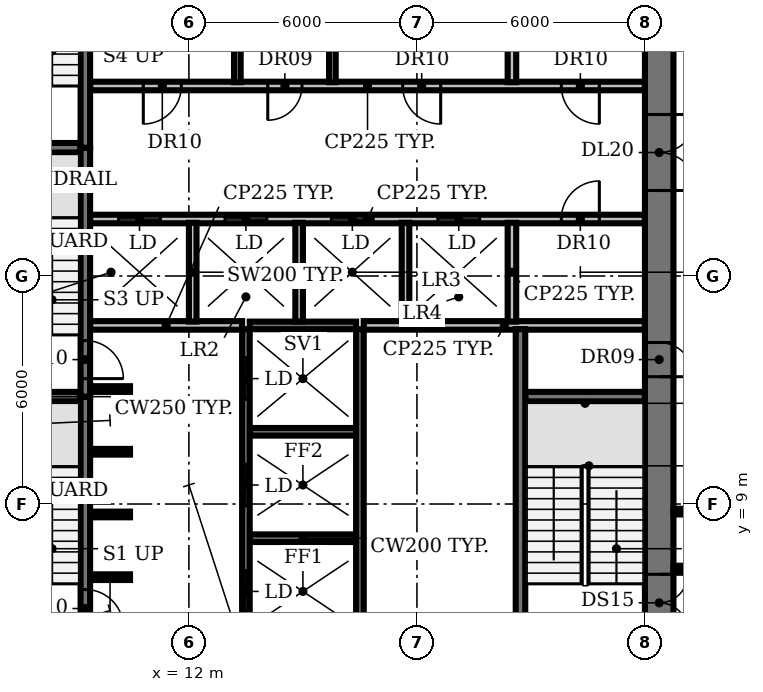
"""IFC4 building model, lengths in metres.
Left out: names, types, materials, properties, quantities, classifications, styles, units other than length and angle.
Written with IfcOpenShell. Run it as: python <this file> out.ifc"""

import sys

from ifc_helpers import new_model, si_unit, direction, frame, frame_2d, origin, place, context, subcontext, project, spatial, rectangle, extrude, element, fill, save


model = new_model("IFC4")
c1 = context("Model", 3, precision=1e-05, world=origin(), true_north=direction((0.0, 1.0)))
c2 = subcontext(c1, "Body", "Model", "MODEL_VIEW")
j1 = project(units=[si_unit("LENGTHUNIT", "METRE"), si_unit("PLANEANGLEUNIT", "RADIAN")], contexts=[c1])
p1 = place(None, origin())
s1 = spatial("IfcSite", under=j1, at=p1, CompositionType="ELEMENT")
p2 = place(p1, origin())
s2 = spatial("IfcBuilding", under=s1, at=p2, CompositionType="ELEMENT")
p3 = place(p2, frame((0.0, 0.0, 121.4)))
s3 = spatial("IfcBuildingStorey", under=s2, at=p3, CompositionType="ELEMENT", Elevation=121.4)
p4 = place(p3, frame((9.4, 7.075, 0.0), z_axis=(0.0, 0.0, 1.0), x_axis=(1.0, 0.0, 0.0)))
e1 = element("IfcWall", 1, at=p4, inside=s3, PredefinedType="SHEAR", context=c2, shape_type="SweptSolid", body=[
    extrude(rectangle(XDim=1.05, YDim=0.15, at=frame_2d((0.525, 0.0))), origin(), (0.0, 0.0, 1.0), 3.85),
])
p5 = place(p3, frame((13.6, 8.1, 0.0), z_axis=(0.0, 0.0, 1.0), x_axis=(1.0, 0.0, 0.0)))
e2 = element("IfcWall", 2, at=p5, inside=s3, PredefinedType="SHEAR", context=c2, shape_type="SweptSolid", body=[
    extrude(rectangle(XDim=2.8, YDim=0.2, at=frame_2d((1.4, 0.0))), origin(), (0.0, 0.0, 1.0), 3.85),
])
for number, where, z_axis, x_axis in (
    (3, (9.4, 8.725, 0.0), (0.0, 0.0, 1.0), (1.0, 0.0, 0.0)),
    (4, (9.4, 10.375, 0.0), (0.0, 0.0, 1.0), (1.0, 0.0, 0.0)),
):
    element("IfcWall", number, at=place(p3, frame(where, z_axis=z_axis, x_axis=x_axis)), inside=s3, PredefinedType="SHEAR", context=c2, shape_type="SweptSolid", body=[
        extrude(rectangle(XDim=1.05, YDim=0.15, at=frame_2d((0.525, 0.0))), origin(), (0.0, 0.0, 1.0), 3.85),
    ])
p6 = place(p3, frame((13.6, 10.9, 0.0), z_axis=(0.0, 0.0, 1.0), x_axis=(1.0, 0.0, 0.0)))
e5 = element("IfcWall", 5, at=p6, inside=s3, PredefinedType="SHEAR", context=c2, shape_type="SweptSolid", body=[
    extrude(rectangle(XDim=2.8, YDim=0.2, at=frame_2d((1.4, 0.0))), origin(), (0.0, 0.0, 1.0), 3.85),
])
for number, where, z_axis, x_axis in (
    (6, (6.0, 11.825, 0.0), (0.0, 0.0, 1.0), (1.0, 0.0, 0.0)),
    (7, (20.85, 11.825, 0.0), (0.0, 0.0, 1.0), (1.0, 0.0, 0.0)),
):
    element("IfcWall", number, at=place(p3, frame(where, z_axis=z_axis, x_axis=x_axis)), inside=s3, PredefinedType="SHEAR", context=c2, shape_type="SweptSolid", body=[
        extrude(rectangle(XDim=3.15, YDim=0.25, at=frame_2d((1.575, 0.0))), origin(), (0.0, 0.0, 1.0), 3.85),
    ])
p7 = place(p3, frame((9.4, 12.025, 0.0), z_axis=(0.0, 0.0, 1.0), x_axis=(1.0, 0.0, 0.0)))
e8 = element("IfcWall", 8, at=p7, inside=s3, PredefinedType="SHEAR", context=c2, shape_type="SweptSolid", body=[
    extrude(rectangle(XDim=1.05, YDim=0.15, at=frame_2d((0.525, 0.0))), origin(), (0.0, 0.0, 1.0), 3.85),
])
p8 = place(p3, frame((9.4, 13.7, 0.0), z_axis=(0.0, 0.0, 1.0), x_axis=(1.0, 0.0, 0.0)))
e9 = element("IfcWall", 9, at=p8, inside=s3, PredefinedType="PARTITIONING", context=c2, shape_type="SweptSolid", body=[
    extrude(rectangle(XDim=4.0, YDim=0.225, at=frame_2d((2.0, 0.0))), origin(), (0.0, 0.0, 1.0), 3.85),
])
p9 = place(p3, frame((13.6, 13.7, 0.0), z_axis=(0.0, 0.0, 1.0), x_axis=(1.0, 0.0, 0.0)))
e10 = element("IfcWall", 10, at=p9, inside=s3, PredefinedType="SHEAR", context=c2, shape_type="SweptSolid", body=[
    extrude(rectangle(XDim=2.8, YDim=0.2, at=frame_2d((1.4, 0.0))), origin(), (0.0, 0.0, 1.0), 3.85),
])
p10 = place(p3, frame((16.6, 13.7, 0.0), z_axis=(0.0, 0.0, 1.0), x_axis=(1.0, 0.0, 0.0)))
e11 = element("IfcWall", 11, at=p10, inside=s3, PredefinedType="PARTITIONING", context=c2, shape_type="SweptSolid", body=[
    extrude(rectangle(XDim=7.4, YDim=0.225, at=frame_2d((3.7, 0.0))), origin(), (0.0, 0.0, 1.0), 3.85),
])
p11 = place(p3, frame((9.4, 16.5, 0.0), z_axis=(0.0, 0.0, 1.0), x_axis=(1.0, 0.0, 0.0)))
e12 = element("IfcWall", 12, at=p11, inside=s3, PredefinedType="PARTITIONING", context=c2, shape_type="SweptSolid", body=[
    extrude(rectangle(XDim=14.6, YDim=0.225, at=frame_2d((7.3, 0.0))), origin(), (0.0, 0.0, 1.0), 3.85),
])
p12 = place(p11, frame((0.75, 0.0, 0.0)))
e13 = element("IfcOpeningElement", 13, at=p12, cuts=e12, PredefinedType="OPENING", context=c2, shape_type="SweptSolid", body=[
    extrude(rectangle(XDim=1.1, YDim=2.1, at=frame_2d((0.55, 1.05))), frame((0.0, 0.123, 0.0), z_axis=(0.0, -1.0, 0.0), x_axis=(1.0, 0.0, 0.0)), (0.0, 0.0, 1.0), 0.245),
])
p13 = place(p11, frame((3.55, 0.0, 0.0)))
e14 = element("IfcOpeningElement", 14, at=p13, cuts=e12, PredefinedType="OPENING", context=c2, shape_type="SweptSolid", body=[
    extrude(rectangle(XDim=1.1, YDim=2.1, at=frame_2d((0.55, 1.05))), frame((0.0, 0.123, 0.0), z_axis=(0.0, -1.0, 0.0), x_axis=(1.0, 0.0, 0.0)), (0.0, 0.0, 1.0), 0.245),
])
p14 = place(p11, frame((6.35, 0.0, 0.0)))
e15 = element("IfcOpeningElement", 15, at=p14, cuts=e12, PredefinedType="OPENING", context=c2, shape_type="SweptSolid", body=[
    extrude(rectangle(XDim=1.1, YDim=2.1, at=frame_2d((0.55, 1.05))), frame((0.0, 0.123, 0.0), z_axis=(0.0, -1.0, 0.0), x_axis=(1.0, 0.0, 0.0)), (0.0, 0.0, 1.0), 0.245),
])
p15 = place(p11, frame((9.15, 0.0, 0.0)))
e16 = element("IfcOpeningElement", 16, at=p15, cuts=e12, PredefinedType="OPENING", context=c2, shape_type="SweptSolid", body=[
    extrude(rectangle(XDim=1.1, YDim=2.1, at=frame_2d((0.55, 1.05))), frame((0.0, 0.123, 0.0), z_axis=(0.0, -1.0, 0.0), x_axis=(1.0, 0.0, 0.0)), (0.0, 0.0, 1.0), 0.245),
])
p16 = place(p11, frame((12.4, 0.0, 0.0)))
e17 = element("IfcOpeningElement", 17, at=p16, cuts=e12, PredefinedType="OPENING", context=c2, shape_type="SweptSolid", body=[
    extrude(rectangle(XDim=1.0, YDim=2.1, at=frame_2d((0.5, 1.05))), frame((0.0, 0.123, 0.0), z_axis=(0.0, -1.0, 0.0), x_axis=(1.0, 0.0, 0.0)), (0.0, 0.0, 1.0), 0.245),
])
p17 = place(p3, frame((6.0, 18.375, 0.0), z_axis=(0.0, 0.0, 1.0), x_axis=(1.0, 0.0, 0.0)))
e18 = element("IfcWall", 18, at=p17, inside=s3, PredefinedType="SHEAR", context=c2, shape_type="SweptSolid", body=[
    extrude(rectangle(XDim=3.15, YDim=0.25, at=frame_2d((1.575, 0.0))), origin(), (0.0, 0.0, 1.0), 3.85),
])
p18 = place(p3, frame((24.0, 20.0, 0.0), z_axis=(0.0, 0.0, 1.0), x_axis=(-1.0, 0.0, 0.0)))
e19 = element("IfcWall", 19, at=p18, inside=s3, PredefinedType="PARTITIONING", context=c2, shape_type="SweptSolid", body=[
    extrude(rectangle(XDim=14.6, YDim=0.225, at=frame_2d((7.3, 0.0))), origin(), (0.0, 0.0, 1.0), 3.85),
])
p19 = place(p18, frame((12.2, 0.0, 0.0)))
e20 = element("IfcOpeningElement", 20, at=p19, cuts=e19, PredefinedType="OPENING", context=c2, shape_type="SweptSolid", body=[
    extrude(rectangle(XDim=1.0, YDim=2.1, at=frame_2d((0.5, 1.05))), frame((0.0, 0.123, 0.0), z_axis=(0.0, -1.0, 0.0), x_axis=(1.0, 0.0, 0.0)), (0.0, 0.0, 1.0), 0.245),
])
p20 = place(p18, frame((9.025, 0.0, 0.0)))
e21 = element("IfcOpeningElement", 21, at=p20, cuts=e19, PredefinedType="OPENING", context=c2, shape_type="SweptSolid", body=[
    extrude(rectangle(XDim=0.9, YDim=2.1, at=frame_2d((0.45, 1.05))), frame((0.0, 0.123, 0.0), z_axis=(0.0, -1.0, 0.0), x_axis=(1.0, 0.0, 0.0)), (0.0, 0.0, 1.0), 0.245),
])
p21 = place(p18, frame((5.375, 0.0, 0.0)))
e22 = element("IfcOpeningElement", 22, at=p21, cuts=e19, PredefinedType="OPENING", context=c2, shape_type="SweptSolid", body=[
    extrude(rectangle(XDim=1.0, YDim=2.1, at=frame_2d((0.5, 1.05))), frame((0.0, 0.123, 0.0), z_axis=(0.0, -1.0, 0.0), x_axis=(1.0, 0.0, 0.0)), (0.0, 0.0, 1.0), 0.245),
])
p22 = place(p18, frame((1.2, 0.0, 0.0)))
e23 = element("IfcOpeningElement", 23, at=p22, cuts=e19, PredefinedType="OPENING", context=c2, shape_type="SweptSolid", body=[
    extrude(rectangle(XDim=1.0, YDim=2.1, at=frame_2d((0.5, 1.05))), frame((0.0, 0.123, 0.0), z_axis=(0.0, -1.0, 0.0), x_axis=(1.0, 0.0, 0.0)), (0.0, 0.0, 1.0), 0.245),
])
p23 = place(p3, frame((9.275, 11.825, 0.0), z_axis=(0.0, 0.0, 1.0), x_axis=(0.0, -1.0, 0.0)))
e24 = element("IfcWall", 24, at=p23, inside=s3, PredefinedType="SHEAR", context=c2, shape_type="SweptSolid", body=[
    extrude(rectangle(XDim=6.425, YDim=0.25, at=frame_2d((3.212, 0.0))), origin(), (0.0, 0.0, 1.0), 3.85),
])
p24 = place(p23, frame((5.075, 0.0, 0.0)))
e25 = element("IfcOpeningElement", 25, at=p24, cuts=e24, PredefinedType="OPENING", context=c2, shape_type="SweptSolid", body=[
    extrude(rectangle(XDim=1.0, YDim=2.1, at=frame_2d((0.5, 1.05))), frame((0.0, 0.135, 0.0), z_axis=(0.0, -1.0, 0.0), x_axis=(1.0, 0.0, 0.0)), (0.0, 0.0, 1.0), 0.27),
])
p25 = place(p3, frame((9.275, 18.375, 0.0), z_axis=(0.0, 0.0, 1.0), x_axis=(0.0, -1.0, 0.0)))
e26 = element("IfcWall", 26, at=p25, inside=s3, PredefinedType="SHEAR", context=c2, shape_type="SweptSolid", body=[
    extrude(rectangle(XDim=6.55, YDim=0.25, at=frame_2d((3.275, 0.0))), origin(), (0.0, 0.0, 1.0), 3.85),
])
p26 = place(p25, frame((5.075, 0.0, 0.0)))
e27 = element("IfcOpeningElement", 27, at=p26, cuts=e26, PredefinedType="OPENING", context=c2, shape_type="SweptSolid", body=[
    extrude(rectangle(XDim=1.0, YDim=2.1, at=frame_2d((0.5, 1.05))), frame((0.0, 0.135, 0.0), z_axis=(0.0, -1.0, 0.0), x_axis=(1.0, 0.0, 0.0)), (0.0, 0.0, 1.0), 0.27),
])
p27 = place(p3, frame((9.275, 18.375, 0.0), z_axis=(0.0, 0.0, 1.0), x_axis=(0.0, 1.0, 0.0)))
e28 = element("IfcWall", 28, at=p27, inside=s3, PredefinedType="SHEAR", context=c2, shape_type="SweptSolid", body=[
    extrude(rectangle(XDim=6.425, YDim=0.25, at=frame_2d((3.212, 0.0))), origin(), (0.0, 0.0, 1.0), 3.85),
])
p28 = place(p3, frame((12.1, 13.8, 0.0), z_axis=(0.0, 0.0, 1.0), x_axis=(0.0, 1.0, 0.0)))
e29 = element("IfcWall", 29, at=p28, inside=s3, PredefinedType="SOLIDWALL", context=c2, shape_type="SweptSolid", body=[
    extrude(rectangle(XDim=2.6, YDim=0.2, at=frame_2d((1.3, 0.0))), origin(), (0.0, 0.0, 1.0), 3.85),
])
p29 = place(p3, frame((13.275, 20.1, 0.0), z_axis=(0.0, 0.0, 1.0), x_axis=(0.0, 1.0, 0.0)))
e30 = element("IfcWall", 30, at=p29, inside=s3, PredefinedType="PARTITIONING", context=c2, shape_type="SweptSolid", body=[
    extrude(rectangle(XDim=2.6, YDim=0.175, at=frame_2d((1.3, 0.0))), origin(), (0.0, 0.0, 1.0), 3.85),
])
p30 = place(p3, frame((13.5, 5.4, 0.0), z_axis=(0.0, 0.0, 1.0), x_axis=(0.0, 1.0, 0.0)))
e31 = element("IfcWall", 31, at=p30, inside=s3, PredefinedType="SHEAR", context=c2, shape_type="SweptSolid", body=[
    extrude(rectangle(XDim=8.2, YDim=0.2, at=frame_2d((4.1, 0.0))), origin(), (0.0, 0.0, 1.0), 3.85),
])
p31 = place(p30, frame((0.75, 0.0, 0.0)))
e32 = element("IfcOpeningElement", 32, at=p31, cuts=e31, PredefinedType="OPENING", context=c2, shape_type="SweptSolid", body=[
    extrude(rectangle(XDim=1.1, YDim=2.1, at=frame_2d((0.55, 1.05))), frame((0.0, 0.11, 0.0), z_axis=(0.0, -1.0, 0.0), x_axis=(1.0, 0.0, 0.0)), (0.0, 0.0, 1.0), 0.22),
])
p32 = place(p30, frame((3.55, 0.0, 0.0)))
e33 = element("IfcOpeningElement", 33, at=p32, cuts=e31, PredefinedType="OPENING", context=c2, shape_type="SweptSolid", body=[
    extrude(rectangle(XDim=1.1, YDim=2.1, at=frame_2d((0.55, 1.05))), frame((0.0, 0.11, 0.0), z_axis=(0.0, -1.0, 0.0), x_axis=(1.0, 0.0, 0.0)), (0.0, 0.0, 1.0), 0.22),
])
p33 = place(p30, frame((6.35, 0.0, 0.0)))
e34 = element("IfcOpeningElement", 34, at=p33, cuts=e31, PredefinedType="OPENING", context=c2, shape_type="SweptSolid", body=[
    extrude(rectangle(XDim=1.1, YDim=2.1, at=frame_2d((0.55, 1.05))), frame((0.0, 0.11, 0.0), z_axis=(0.0, -1.0, 0.0), x_axis=(1.0, 0.0, 0.0)), (0.0, 0.0, 1.0), 0.22),
])
p34 = place(p3, frame((14.9, 13.8, 0.0), z_axis=(0.0, 0.0, 1.0), x_axis=(0.0, 1.0, 0.0)))
e35 = element("IfcWall", 35, at=p34, inside=s3, PredefinedType="SOLIDWALL", context=c2, shape_type="SweptSolid", body=[
    extrude(rectangle(XDim=2.6, YDim=0.2, at=frame_2d((1.3, 0.0))), origin(), (0.0, 0.0, 1.0), 3.85),
])
p35 = place(p3, frame((15.775, 20.1, 0.0), z_axis=(0.0, 0.0, 1.0), x_axis=(0.0, 1.0, 0.0)))
e36 = element("IfcWall", 36, at=p35, inside=s3, PredefinedType="PARTITIONING", context=c2, shape_type="SweptSolid", body=[
    extrude(rectangle(XDim=2.6, YDim=0.175, at=frame_2d((1.3, 0.0))), origin(), (0.0, 0.0, 1.0), 3.85),
])
p36 = place(p3, frame((16.5, 5.4, 0.0), z_axis=(0.0, 0.0, 1.0), x_axis=(0.0, 1.0, 0.0)))
e37 = element("IfcWall", 37, at=p36, inside=s3, PredefinedType="SHEAR", context=c2, shape_type="SweptSolid", body=[
    extrude(rectangle(XDim=8.2, YDim=0.2, at=frame_2d((4.1, 0.0))), origin(), (0.0, 0.0, 1.0), 3.85),
])
p37 = place(p3, frame((17.7, 13.8, 0.0), z_axis=(0.0, 0.0, 1.0), x_axis=(0.0, 1.0, 0.0)))
e38 = element("IfcWall", 38, at=p37, inside=s3, PredefinedType="SOLIDWALL", context=c2, shape_type="SweptSolid", body=[
    extrude(rectangle(XDim=2.6, YDim=0.2, at=frame_2d((1.3, 0.0))), origin(), (0.0, 0.0, 1.0), 3.85),
])
for number, where, z_axis, x_axis in (
    (39, (20.5, 13.8, 0.0), (0.0, 0.0, 1.0), (0.0, 1.0, 0.0)),
    (40, (20.5, 20.1, 0.0), (0.0, 0.0, 1.0), (0.0, 1.0, 0.0)),
):
    element("IfcWall", number, at=place(p3, frame(where, z_axis=z_axis, x_axis=x_axis)), inside=s3, PredefinedType="PARTITIONING", context=c2, shape_type="SweptSolid", body=[
        extrude(rectangle(XDim=2.6, YDim=0.225, at=frame_2d((1.3, 0.0))), origin(), (0.0, 0.0, 1.0), 3.85),
    ])
p38 = place(p3, frame((20.725, 5.4, 0.0), z_axis=(0.0, 0.0, 1.0), x_axis=(0.0, 1.0, 0.0)))
e41 = element("IfcWall", 41, at=p38, inside=s3, PredefinedType="SHEAR", context=c2, shape_type="SweptSolid", body=[
    extrude(rectangle(XDim=8.2, YDim=0.25, at=frame_2d((4.1, 0.0))), origin(), (0.0, 0.0, 1.0), 3.85),
])
p39 = place(p3, frame((24.375, 25.55, 0.0), z_axis=(0.0, 0.0, 1.0), x_axis=(0.0, -1.0, 0.0)))
e42 = element("IfcWall", 42, at=p39, inside=s3, PredefinedType="SHEAR", context=c2, shape_type="SweptSolid", body=[
    extrude(rectangle(XDim=21.13, YDim=0.75, at=frame_2d((10.565, 0.0))), origin(), (0.0, 0.0, 1.0), 3.85),
])
p40 = place(p39, frame((18.4, 0.0, 0.0)))
e43 = element("IfcOpeningElement", 43, at=p40, cuts=e42, PredefinedType="OPENING", context=c2, shape_type="SweptSolid", body=[
    extrude(rectangle(XDim=1.5, YDim=2.1, at=frame_2d((0.75, 1.05))), frame((0.0, 0.385, 0.0), z_axis=(0.0, -1.0, 0.0), x_axis=(1.0, 0.0, 0.0)), (0.0, 0.0, 1.0), 0.77),
])
p41 = place(p39, frame((12.3, 0.0, 0.0)))
e44 = element("IfcOpeningElement", 44, at=p41, cuts=e42, PredefinedType="OPENING", context=c2, shape_type="SweptSolid", body=[
    extrude(rectangle(XDim=0.9, YDim=2.1, at=frame_2d((0.45, 1.05))), frame((0.0, 0.385, 0.0), z_axis=(0.0, -1.0, 0.0), x_axis=(1.0, 0.0, 0.0)), (0.0, 0.0, 1.0), 0.77),
])
p42 = place(p39, frame((6.3, 0.0, 0.0)))
e45 = element("IfcOpeningElement", 45, at=p42, cuts=e42, PredefinedType="OPENING", context=c2, shape_type="SweptSolid", body=[
    extrude(rectangle(XDim=2.0, YDim=2.1, at=frame_2d((1.0, 1.05))), frame((0.0, 0.385, 0.0), z_axis=(0.0, -1.0, 0.0), x_axis=(1.0, 0.0, 0.0)), (0.0, 0.0, 1.0), 0.77),
])
for number, where, z_axis, x_axis in (
    (46, (24.75, 7.3, 0.0), (0.0, 0.0, 1.0), (1.0, 0.0, 0.0)),
    (47, (24.75, 8.8, 0.0), (0.0, 0.0, 1.0), (1.0, 0.0, 0.0)),
):
    element("IfcWall", number, at=place(p3, frame(where, z_axis=z_axis, x_axis=x_axis)), inside=s3, PredefinedType="PARTITIONING", context=c2, shape_type="SweptSolid", body=[
        extrude(rectangle(XDim=1.05, YDim=0.15, at=frame_2d((0.525, 0.0))), origin(), (0.0, 0.0, 1.0), 2.83),
    ])
p43 = place(p12, origin())
e48 = element("IfcDoor", 48, at=p43, inside=s3, OperationType="DOUBLE_DOOR_SLIDING", PredefinedType="DOOR", context=c2, shape_type="SweptSolid", body=[
    extrude(rectangle(XDim=1.1, YDim=2.1, at=frame_2d((0.55, 1.05))), frame((0.0, 0.025, 0.0), z_axis=(0.0, -1.0, 0.0), x_axis=(1.0, 0.0, 0.0)), (0.0, 0.0, 1.0), 0.05),
])
fill(e13, e48)
p44 = place(p13, origin())
e49 = element("IfcDoor", 49, at=p44, inside=s3, OperationType="DOUBLE_DOOR_SLIDING", PredefinedType="DOOR", context=c2, shape_type="SweptSolid", body=[
    extrude(rectangle(XDim=1.1, YDim=2.1, at=frame_2d((0.55, 1.05))), frame((0.0, 0.025, 0.0), z_axis=(0.0, -1.0, 0.0), x_axis=(1.0, 0.0, 0.0)), (0.0, 0.0, 1.0), 0.05),
])
fill(e14, e49)
p45 = place(p14, origin())
e50 = element("IfcDoor", 50, at=p45, inside=s3, OperationType="DOUBLE_DOOR_SLIDING", PredefinedType="DOOR", context=c2, shape_type="SweptSolid", body=[
    extrude(rectangle(XDim=1.1, YDim=2.1, at=frame_2d((0.55, 1.05))), frame((0.0, 0.025, 0.0), z_axis=(0.0, -1.0, 0.0), x_axis=(1.0, 0.0, 0.0)), (0.0, 0.0, 1.0), 0.05),
])
fill(e15, e50)
p46 = place(p15, origin())
e51 = element("IfcDoor", 51, at=p46, inside=s3, OperationType="DOUBLE_DOOR_SLIDING", PredefinedType="DOOR", context=c2, shape_type="SweptSolid", body=[
    extrude(rectangle(XDim=1.1, YDim=2.1, at=frame_2d((0.55, 1.05))), frame((0.0, 0.025, 0.0), z_axis=(0.0, -1.0, 0.0), x_axis=(1.0, 0.0, 0.0)), (0.0, 0.0, 1.0), 0.05),
])
fill(e16, e51)
p47 = place(p16, origin())
e52 = element("IfcDoor", 52, at=p47, inside=s3, OperationType="SINGLE_SWING_RIGHT", PredefinedType="DOOR", context=c2, shape_type="SweptSolid", body=[
    extrude(rectangle(XDim=1.0, YDim=2.1, at=frame_2d((0.5, 1.05))), frame((0.0, 0.025, 0.0), z_axis=(0.0, -1.0, 0.0), x_axis=(1.0, 0.0, 0.0)), (0.0, 0.0, 1.0), 0.05),
])
fill(e17, e52)
p48 = place(p19, origin())
e53 = element("IfcDoor", 53, at=p48, inside=s3, OperationType="SINGLE_SWING_RIGHT", PredefinedType="DOOR", context=c2, shape_type="SweptSolid", body=[
    extrude(rectangle(XDim=1.0, YDim=2.1, at=frame_2d((0.5, 1.05))), frame((0.0, 0.025, 0.0), z_axis=(0.0, -1.0, 0.0), x_axis=(1.0, 0.0, 0.0)), (0.0, 0.0, 1.0), 0.05),
])
fill(e20, e53)
p49 = place(p20, origin())
e54 = element("IfcDoor", 54, at=p49, inside=s3, OperationType="SINGLE_SWING_RIGHT", PredefinedType="DOOR", context=c2, shape_type="SweptSolid", body=[
    extrude(rectangle(XDim=0.9, YDim=2.1, at=frame_2d((0.45, 1.05))), frame((0.0, 0.025, 0.0), z_axis=(0.0, -1.0, 0.0), x_axis=(1.0, 0.0, 0.0)), (0.0, 0.0, 1.0), 0.05),
])
fill(e21, e54)
p50 = place(p21, origin())
e55 = element("IfcDoor", 55, at=p50, inside=s3, OperationType="SINGLE_SWING_LEFT", PredefinedType="DOOR", context=c2, shape_type="SweptSolid", body=[
    extrude(rectangle(XDim=1.0, YDim=2.1, at=frame_2d((0.5, 1.05))), frame((0.0, 0.025, 0.0), z_axis=(0.0, -1.0, 0.0), x_axis=(1.0, 0.0, 0.0)), (0.0, 0.0, 1.0), 0.05),
])
fill(e22, e55)
p51 = place(p22, origin())
e56 = element("IfcDoor", 56, at=p51, inside=s3, OperationType="SINGLE_SWING_LEFT", PredefinedType="DOOR", context=c2, shape_type="SweptSolid", body=[
    extrude(rectangle(XDim=1.0, YDim=2.1, at=frame_2d((0.5, 1.05))), frame((0.0, 0.025, 0.0), z_axis=(0.0, -1.0, 0.0), x_axis=(1.0, 0.0, 0.0)), (0.0, 0.0, 1.0), 0.05),
])
fill(e23, e56)
p52 = place(p24, origin())
e57 = element("IfcDoor", 57, at=p52, inside=s3, OperationType="SINGLE_SWING_RIGHT", PredefinedType="DOOR", context=c2, shape_type="SweptSolid", body=[
    extrude(rectangle(XDim=1.0, YDim=2.1, at=frame_2d((0.5, 1.05))), frame((0.0, 0.025, 0.0), z_axis=(0.0, -1.0, 0.0), x_axis=(1.0, 0.0, 0.0)), (0.0, 0.0, 1.0), 0.05),
])
fill(e25, e57)
p53 = place(p26, origin())
e58 = element("IfcDoor", 58, at=p53, inside=s3, OperationType="SINGLE_SWING_RIGHT", PredefinedType="DOOR", context=c2, shape_type="SweptSolid", body=[
    extrude(rectangle(XDim=1.0, YDim=2.1, at=frame_2d((0.5, 1.05))), frame((0.0, 0.025, 0.0), z_axis=(0.0, -1.0, 0.0), x_axis=(1.0, 0.0, 0.0)), (0.0, 0.0, 1.0), 0.05),
])
fill(e27, e58)
p54 = place(p31, origin())
e59 = element("IfcDoor", 59, at=p54, inside=s3, OperationType="DOUBLE_DOOR_SLIDING", PredefinedType="DOOR", context=c2, shape_type="SweptSolid", body=[
    extrude(rectangle(XDim=1.1, YDim=2.1, at=frame_2d((0.55, 1.05))), frame((0.0, 0.025, 0.0), z_axis=(0.0, -1.0, 0.0), x_axis=(1.0, 0.0, 0.0)), (0.0, 0.0, 1.0), 0.05),
])
fill(e32, e59)
p55 = place(p32, origin())
e60 = element("IfcDoor", 60, at=p55, inside=s3, OperationType="DOUBLE_DOOR_SLIDING", PredefinedType="DOOR", context=c2, shape_type="SweptSolid", body=[
    extrude(rectangle(XDim=1.1, YDim=2.1, at=frame_2d((0.55, 1.05))), frame((0.0, 0.025, 0.0), z_axis=(0.0, -1.0, 0.0), x_axis=(1.0, 0.0, 0.0)), (0.0, 0.0, 1.0), 0.05),
])
fill(e33, e60)
p56 = place(p33, origin())
e61 = element("IfcDoor", 61, at=p56, inside=s3, OperationType="DOUBLE_DOOR_SLIDING", PredefinedType="DOOR", context=c2, shape_type="SweptSolid", body=[
    extrude(rectangle(XDim=1.1, YDim=2.1, at=frame_2d((0.55, 1.05))), frame((0.0, 0.025, 0.0), z_axis=(0.0, -1.0, 0.0), x_axis=(1.0, 0.0, 0.0)), (0.0, 0.0, 1.0), 0.05),
])
fill(e34, e61)
p57 = place(p40, origin())
e62 = element("IfcDoor", 62, at=p57, inside=s3, OperationType="DOUBLE_DOOR_SINGLE_SWING", PredefinedType="DOOR", context=c2, shape_type="SweptSolid", body=[
    extrude(rectangle(XDim=1.5, YDim=2.1, at=frame_2d((0.75, 1.05))), frame((0.0, 0.025, 0.0), z_axis=(0.0, -1.0, 0.0), x_axis=(1.0, 0.0, 0.0)), (0.0, 0.0, 1.0), 0.05),
])
fill(e43, e62)
p58 = place(p41, origin())
e63 = element("IfcDoor", 63, at=p58, inside=s3, OperationType="SINGLE_SWING_RIGHT", PredefinedType="DOOR", context=c2, shape_type="SweptSolid", body=[
    extrude(rectangle(XDim=0.9, YDim=2.1, at=frame_2d((0.45, 1.05))), frame((0.0, -0.315, 0.0), z_axis=(0.0, -1.0, 0.0), x_axis=(1.0, 0.0, 0.0)), (0.0, 0.0, 1.0), 0.05),
])
fill(e44, e63)
p59 = place(p42, origin())
e64 = element("IfcDoor", 64, at=p59, inside=s3, OperationType="DOUBLE_DOOR_SINGLE_SWING", PredefinedType="DOOR", context=c2, shape_type="SweptSolid", body=[
    extrude(rectangle(XDim=2.0, YDim=2.1, at=frame_2d((1.0, 1.05))), frame((0.0, 0.025, 0.0), z_axis=(0.0, -1.0, 0.0), x_axis=(1.0, 0.0, 0.0)), (0.0, 0.0, 1.0), 0.05),
])
fill(e45, e64)
save(model, sys.argv[1])
